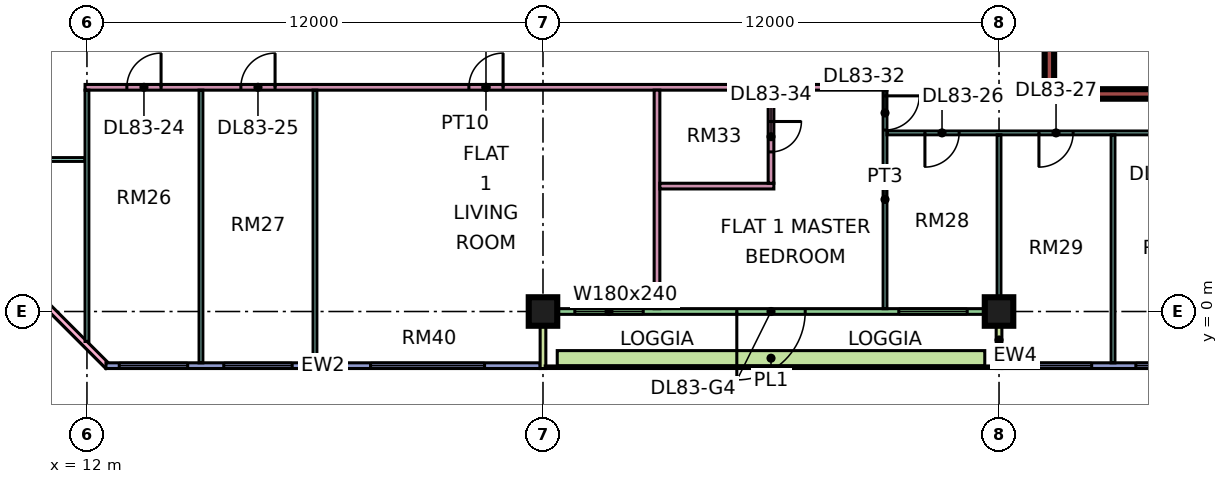
"""IFC4 building model, lengths in metres.
Left out: names, types, materials, properties, quantities, classifications, styles, units other than length and angle.
Written with IfcOpenShell. Run it as: python <this file> out.ifc"""

import sys

from ifc_helpers import new_model, si_unit, direction, frame, frame_2d, origin, origin_2d, place, context, subcontext, project, spatial, rectangle, extrude, element, fill, save


model = new_model("IFC4")
c1 = context("Model", 3, precision=1e-05, world=origin(), true_north=direction((0.0, 1.0)))
c2 = subcontext(c1, "Body", "Model", "MODEL_VIEW")
j1 = project(units=[si_unit("LENGTHUNIT", "METRE"), si_unit("PLANEANGLEUNIT", "RADIAN")], contexts=[c1])
p1 = place(None, origin())
s1 = spatial("IfcSite", under=j1, at=p1, CompositionType="ELEMENT")
p2 = place(p1, origin())
s2 = spatial("IfcBuilding", under=s1, at=p2, CompositionType="ELEMENT")
p3 = place(p2, frame((0.0, 0.0, 357.65)))
s3 = spatial("IfcBuildingStorey", under=s2, at=p3, CompositionType="ELEMENT", Elevation=357.65)
for number, where, z_axis, x_axis in (
    (1, (24.0, 0.0, 0.0), (0.0, 0.0, 1.0), (1.0, 0.0, 0.0)),
    (2, (36.0, 0.0, 0.0), (0.0, 0.0, 1.0), (1.0, 0.0, 0.0)),
):
    element("IfcColumn", number, at=place(p3, frame(where, z_axis=z_axis, x_axis=x_axis)), inside=s3, PredefinedType="COLUMN", context=c2, shape_type="SweptSolid", body=[
        extrude(rectangle(XDim=0.75, YDim=0.75, at=origin_2d()), origin(), (0.0, 0.0, 1.0), 3.75),
    ])
p4 = place(p3, frame((37.2, 5.725, 0.0), z_axis=(0.0, 0.0, 1.0), x_axis=(1.0, 0.0, 0.0)))
e3 = element("IfcWall", 3, at=p4, inside=s3, PredefinedType="SHEAR", context=c2, shape_type="SweptSolid", body=[
    extrude(rectangle(XDim=3.45, YDim=0.25, at=frame_2d((1.725, 0.0))), origin(), (0.0, 0.0, 1.0), 3.75),
])
p5 = place(p3, frame((37.325, 5.85, 0.0), z_axis=(0.0, 0.0, 1.0), x_axis=(0.0, 1.0, 0.0)))
e4 = element("IfcWall", 4, at=p5, inside=s3, PredefinedType="SHEAR", context=c2, shape_type="SweptSolid", body=[
    extrude(rectangle(XDim=6.5, YDim=0.25, at=frame_2d((3.25, 0.0))), origin(), (0.0, 0.0, 1.0), 3.75),
])
p6 = place(p3, frame((-1.447, 12.553, 0.0), z_axis=(0.0, 0.0, 1.0), x_axis=(0.707106781187, -0.707106781187, 0.0)))
e5 = element("IfcWall", 5, at=p6, inside=s3, PredefinedType="SOLIDWALL", context=c2, shape_type="SweptSolid", body=[
    extrude(rectangle(XDim=19.799, YDim=0.15, at=frame_2d((9.899, 0.0))), origin(), (0.0, 0.0, 1.0), 3.35),
])
p7 = place(p6, frame((2.212, 0.0, 0.45)))
e6 = element("IfcOpeningElement", 6, at=p7, cuts=e5, PredefinedType="OPENING", context=c2, shape_type="SweptSolid", body=[
    extrude(rectangle(XDim=3.0, YDim=2.4, at=frame_2d((1.5, 1.2))), frame((0.0, 0.085, 0.0), z_axis=(0.0, -1.0, 0.0), x_axis=(1.0, 0.0, 0.0)), (0.0, 0.0, 1.0), 0.17),
])
p8 = place(p6, frame((10.216, 0.0, 0.45)))
e7 = element("IfcOpeningElement", 7, at=p8, cuts=e5, PredefinedType="OPENING", context=c2, shape_type="SweptSolid", body=[
    extrude(rectangle(XDim=3.0, YDim=2.4, at=frame_2d((1.5, 1.2))), frame((0.0, 0.085, 0.0), z_axis=(0.0, -1.0, 0.0), x_axis=(1.0, 0.0, 0.0)), (0.0, 0.0, 1.0), 0.17),
])
p9 = place(p3, frame((12.5, -1.425, 0.0), z_axis=(0.0, 0.0, 1.0), x_axis=(1.0, 0.0, 0.0)))
e8 = element("IfcWall", 8, at=p9, inside=s3, PredefinedType="SOLIDWALL", context=c2, shape_type="SweptSolid", body=[
    extrude(rectangle(XDim=11.425, YDim=0.15, at=frame_2d((5.712, 0.0))), origin(), (0.0, 0.0, 1.0), 3.35),
])
p10 = place(p9, frame((0.35, 0.0, 0.45)))
e9 = element("IfcOpeningElement", 9, at=p10, cuts=e8, PredefinedType="OPENING", context=c2, shape_type="SweptSolid", body=[
    extrude(rectangle(XDim=1.8, YDim=2.4, at=frame_2d((0.9, 1.2))), frame((0.0, 0.085, 0.0), z_axis=(0.0, -1.0, 0.0), x_axis=(1.0, 0.0, 0.0)), (0.0, 0.0, 1.0), 0.17),
])
p11 = place(p9, frame((3.1, 0.0, 0.45)))
e10 = element("IfcOpeningElement", 10, at=p11, cuts=e8, PredefinedType="OPENING", context=c2, shape_type="SweptSolid", body=[
    extrude(rectangle(XDim=1.8, YDim=2.4, at=frame_2d((0.9, 1.2))), frame((0.0, 0.085, 0.0), z_axis=(0.0, -1.0, 0.0), x_axis=(1.0, 0.0, 0.0)), (0.0, 0.0, 1.0), 0.17),
])
p12 = place(p9, frame((6.962, 0.0, 0.45)))
e11 = element("IfcOpeningElement", 11, at=p12, cuts=e8, PredefinedType="OPENING", context=c2, shape_type="SweptSolid", body=[
    extrude(rectangle(XDim=3.0, YDim=2.4, at=frame_2d((1.5, 1.2))), frame((0.0, 0.085, 0.0), z_axis=(0.0, -1.0, 0.0), x_axis=(1.0, 0.0, 0.0)), (0.0, 0.0, 1.0), 0.17),
])
p13 = place(p3, frame((24.075, 0.0, 0.0), z_axis=(0.0, 0.0, 1.0), x_axis=(1.0, 0.0, 0.0)))
e12 = element("IfcWall", 12, at=p13, inside=s3, PredefinedType="SOLIDWALL", context=c2, shape_type="SweptSolid", body=[
    extrude(rectangle(XDim=11.85, YDim=0.15, at=frame_2d((5.925, 0.0))), origin(), (0.0, 0.0, 1.0), 3.35),
])
p14 = place(p13, frame((0.762, 0.0, 0.45)))
e13 = element("IfcOpeningElement", 13, at=p14, cuts=e12, PredefinedType="OPENING", context=c2, shape_type="SweptSolid", body=[
    extrude(rectangle(XDim=1.8, YDim=2.4, at=frame_2d((0.9, 1.2))), frame((0.0, 0.085, 0.0), z_axis=(0.0, -1.0, 0.0), x_axis=(1.0, 0.0, 0.0)), (0.0, 0.0, 1.0), 0.17),
])
p15 = place(p13, frame((5.025, 0.0, 0.0)))
e14 = element("IfcOpeningElement", 14, at=p15, cuts=e12, PredefinedType="OPENING", context=c2, shape_type="SweptSolid", body=[
    extrude(rectangle(XDim=1.8, YDim=2.4, at=frame_2d((0.9, 1.2))), frame((0.0, 0.085, 0.0), z_axis=(0.0, -1.0, 0.0), x_axis=(1.0, 0.0, 0.0)), (0.0, 0.0, 1.0), 0.17),
])
p16 = place(p13, frame((9.288, 0.0, 0.45)))
e15 = element("IfcOpeningElement", 15, at=p16, cuts=e12, PredefinedType="OPENING", context=c2, shape_type="SweptSolid", body=[
    extrude(rectangle(XDim=1.8, YDim=2.4, at=frame_2d((0.9, 1.2))), frame((0.0, 0.085, 0.0), z_axis=(0.0, -1.0, 0.0), x_axis=(1.0, 0.0, 0.0)), (0.0, 0.0, 1.0), 0.17),
])
for number, where, z_axis, x_axis in (
    (16, (24.0, -1.5, 0.0), (0.0, 0.0, 1.0), (0.0, 1.0, 0.0)),
    (17, (36.0, -1.5, 0.0), (0.0, 0.0, 1.0), (0.0, 1.0, 0.0)),
):
    element("IfcWall", number, at=place(p3, frame(where, z_axis=z_axis, x_axis=x_axis)), inside=s3, PredefinedType="SOLIDWALL", context=c2, shape_type="SweptSolid", body=[
        extrude(rectangle(XDim=1.5, YDim=0.15, at=frame_2d((0.75, 0.0))), origin(), (0.0, 0.0, 1.0), 3.35),
    ])
p17 = place(p3, frame((36.075, -1.425, 0.0), z_axis=(0.0, 0.0, 1.0), x_axis=(1.0, 0.0, 0.0)))
e18 = element("IfcWall", 18, at=p17, inside=s3, PredefinedType="SOLIDWALL", context=c2, shape_type="SweptSolid", body=[
    extrude(rectangle(XDim=11.85, YDim=0.15, at=frame_2d((5.925, 0.0))), origin(), (0.0, 0.0, 1.0), 3.35),
])
p18 = place(p17, frame((0.562, 0.0, 0.45)))
e19 = element("IfcOpeningElement", 19, at=p18, cuts=e18, PredefinedType="OPENING", context=c2, shape_type="SweptSolid", body=[
    extrude(rectangle(XDim=1.8, YDim=2.4, at=frame_2d((0.9, 1.2))), frame((0.0, 0.085, 0.0), z_axis=(0.0, -1.0, 0.0), x_axis=(1.0, 0.0, 0.0)), (0.0, 0.0, 1.0), 0.17),
])
p19 = place(p17, frame((3.525, 0.0, 0.45)))
e20 = element("IfcOpeningElement", 20, at=p19, cuts=e18, PredefinedType="OPENING", context=c2, shape_type="SweptSolid", body=[
    extrude(rectangle(XDim=1.8, YDim=2.4, at=frame_2d((0.9, 1.2))), frame((0.0, 0.085, 0.0), z_axis=(0.0, -1.0, 0.0), x_axis=(1.0, 0.0, 0.0)), (0.0, 0.0, 1.0), 0.17),
])
p20 = place(p17, frame((6.525, 0.0, 0.45)))
e21 = element("IfcOpeningElement", 21, at=p20, cuts=e18, PredefinedType="OPENING", context=c2, shape_type="SweptSolid", body=[
    extrude(rectangle(XDim=1.8, YDim=2.4, at=frame_2d((0.9, 1.2))), frame((0.0, 0.085, 0.0), z_axis=(0.0, -1.0, 0.0), x_axis=(1.0, 0.0, 0.0)), (0.0, 0.0, 1.0), 0.17),
])
p21 = place(p17, frame((9.488, 0.0, 0.45)))
e22 = element("IfcOpeningElement", 22, at=p21, cuts=e18, PredefinedType="OPENING", context=c2, shape_type="SweptSolid", body=[
    extrude(rectangle(XDim=1.8, YDim=2.4, at=frame_2d((0.9, 1.2))), frame((0.0, 0.085, 0.0), z_axis=(0.0, -1.0, 0.0), x_axis=(1.0, 0.0, 0.0)), (0.0, 0.0, 1.0), 0.17),
])
p22 = place(p3, frame((24.375, -1.229, 0.0), z_axis=(0.0, 0.0, 1.0), x_axis=(1.0, 0.0, 0.0)))
e23 = element("IfcWall", 23, at=p22, inside=s3, PredefinedType="SOLIDWALL", context=c2, shape_type="SweptSolid", body=[
    extrude(rectangle(XDim=11.25, YDim=0.4, at=frame_2d((5.625, 0.0))), origin(), (0.0, 0.0, 1.0), 0.7),
])
p23 = place(p3, frame((9.05, 4.0, 0.0), z_axis=(0.0, 0.0, 1.0), x_axis=(1.0, 0.0, 0.0)))
e24 = element("IfcWall", 24, at=p23, inside=s3, PredefinedType="PARTITIONING", context=c2, shape_type="SweptSolid", body=[
    extrude(rectangle(XDim=2.9, YDim=0.1, at=frame_2d((1.45, 0.0))), origin(), (0.0, 0.0, 1.0), 3.35),
])
p24 = place(p3, frame((11.95, 5.9, 0.0), z_axis=(0.0, 0.0, 1.0), x_axis=(1.0, 0.0, 0.0)))
e25 = element("IfcWall", 25, at=p24, inside=s3, PredefinedType="PARTITIONING", context=c2, shape_type="SweptSolid", body=[
    extrude(rectangle(XDim=21.1, YDim=0.15, at=frame_2d((10.55, 0.0))), origin(), (0.0, 0.0, 1.0), 3.35),
])
p25 = place(p24, frame((1.1, 0.0, 0.0)))
e26 = element("IfcOpeningElement", 26, at=p25, cuts=e25, PredefinedType="OPENING", context=c2, shape_type="SweptSolid", body=[
    extrude(rectangle(XDim=0.9, YDim=2.1, at=frame_2d((0.45, 1.05))), frame((0.0, 0.085, 0.0), z_axis=(0.0, -1.0, 0.0), x_axis=(1.0, 0.0, 0.0)), (0.0, 0.0, 1.0), 0.17),
])
p26 = place(p24, frame((4.1, 0.0, 0.0)))
e27 = element("IfcOpeningElement", 27, at=p26, cuts=e25, PredefinedType="OPENING", context=c2, shape_type="SweptSolid", body=[
    extrude(rectangle(XDim=0.9, YDim=2.1, at=frame_2d((0.45, 1.05))), frame((0.0, 0.085, 0.0), z_axis=(0.0, -1.0, 0.0), x_axis=(1.0, 0.0, 0.0)), (0.0, 0.0, 1.0), 0.17),
])
p27 = place(p24, frame((10.1, 0.0, 0.0)))
e28 = element("IfcOpeningElement", 28, at=p27, cuts=e25, PredefinedType="OPENING", context=c2, shape_type="SweptSolid", body=[
    extrude(rectangle(XDim=0.9, YDim=2.1, at=frame_2d((0.45, 1.05))), frame((0.0, 0.085, 0.0), z_axis=(0.0, -1.0, 0.0), x_axis=(1.0, 0.0, 0.0)), (0.0, 0.0, 1.0), 0.17),
])
p28 = place(p3, frame((12.0, -0.788, 0.0), z_axis=(0.0, 0.0, 1.0), x_axis=(0.0, 1.0, 0.0)))
e29 = element("IfcWall", 29, at=p28, inside=s3, PredefinedType="PARTITIONING", context=c2, shape_type="SweptSolid", body=[
    extrude(rectangle(XDim=6.613, YDim=0.1, at=frame_2d((3.306, 0.0))), origin(), (0.0, 0.0, 1.0), 3.35),
])
p29 = place(p3, frame((15.0, -1.351, 0.0), z_axis=(0.0, 0.0, 1.0), x_axis=(0.0, 1.0, 0.0)))
e30 = element("IfcWall", 30, at=p29, inside=s3, PredefinedType="PARTITIONING", context=c2, shape_type="SweptSolid", body=[
    extrude(rectangle(XDim=7.176, YDim=0.1, at=frame_2d((3.588, 0.0))), origin(), (0.0, 0.0, 1.0), 3.35),
])
p30 = place(p3, frame((18.0, -1.35, 0.0), z_axis=(0.0, 0.0, 1.0), x_axis=(0.0, 1.0, 0.0)))
e31 = element("IfcWall", 31, at=p30, inside=s3, PredefinedType="PARTITIONING", context=c2, shape_type="SweptSolid", body=[
    extrude(rectangle(XDim=7.175, YDim=0.1, at=frame_2d((3.587, 0.0))), origin(), (0.0, 0.0, 1.0), 3.35),
])
p31 = place(p3, frame((27.0, 0.074, 0.0), z_axis=(0.0, 0.0, 1.0), x_axis=(0.0, 1.0, 0.0)))
e32 = element("IfcWall", 32, at=p31, inside=s3, PredefinedType="PARTITIONING", context=c2, shape_type="SweptSolid", body=[
    extrude(rectangle(XDim=5.751, YDim=0.15, at=frame_2d((2.875, 0.0))), origin(), (0.0, 0.0, 1.0), 3.35),
])
p32 = place(p3, frame((27.075, 3.3, 0.0), z_axis=(0.0, 0.0, 1.0), x_axis=(1.0, 0.0, 0.0)))
e33 = element("IfcWall", 33, at=p32, inside=s3, PredefinedType="PARTITIONING", context=c2, shape_type="SweptSolid", body=[
    extrude(rectangle(XDim=3.0, YDim=0.15, at=frame_2d((1.5, 0.0))), origin(), (0.0, 0.0, 1.0), 3.35),
])
p33 = place(p3, frame((30.0, 3.375, 0.0), z_axis=(0.0, 0.0, 1.0), x_axis=(0.0, 1.0, 0.0)))
e34 = element("IfcWall", 34, at=p33, inside=s3, PredefinedType="PARTITIONING", context=c2, shape_type="SweptSolid", body=[
    extrude(rectangle(XDim=2.45, YDim=0.15, at=frame_2d((1.225, 0.0))), origin(), (0.0, 0.0, 1.0), 3.35),
])
p34 = place(p33, frame((0.825, 0.0, 0.0)))
e35 = element("IfcOpeningElement", 35, at=p34, cuts=e34, PredefinedType="OPENING", context=c2, shape_type="SweptSolid", body=[
    extrude(rectangle(XDim=0.8, YDim=2.1, at=frame_2d((0.4, 1.05))), frame((0.0, 0.085, 0.0), z_axis=(0.0, -1.0, 0.0), x_axis=(1.0, 0.0, 0.0)), (0.0, 0.0, 1.0), 0.17),
])
p35 = place(p3, frame((33.0, 0.074, 0.0), z_axis=(0.0, 0.0, 1.0), x_axis=(0.0, 1.0, 0.0)))
e36 = element("IfcWall", 36, at=p35, inside=s3, PredefinedType="PARTITIONING", context=c2, shape_type="SweptSolid", body=[
    extrude(rectangle(XDim=5.751, YDim=0.1, at=frame_2d((2.875, 0.0))), origin(), (0.0, 0.0, 1.0), 3.35),
])
p36 = place(p35, frame((4.701, 0.0, 0.0)))
e37 = element("IfcOpeningElement", 37, at=p36, cuts=e36, PredefinedType="OPENING", context=c2, shape_type="SweptSolid", body=[
    extrude(rectangle(XDim=0.9, YDim=2.1, at=frame_2d((0.45, 1.05))), frame((0.0, 0.06, 0.0), z_axis=(0.0, -1.0, 0.0), x_axis=(1.0, 0.0, 0.0)), (0.0, 0.0, 1.0), 0.12),
])
p37 = place(p3, frame((33.05, 4.7, 0.0), z_axis=(0.0, 0.0, 1.0), x_axis=(1.0, 0.0, 0.0)))
e38 = element("IfcWall", 38, at=p37, inside=s3, PredefinedType="PARTITIONING", context=c2, shape_type="SweptSolid", body=[
    extrude(rectangle(XDim=20.876, YDim=0.1, at=frame_2d((10.438, 0.0))), origin(), (0.0, 0.0, 1.0), 3.35),
])
p38 = place(p37, frame((1.0, 0.0, 0.0)))
e39 = element("IfcOpeningElement", 39, at=p38, cuts=e38, PredefinedType="OPENING", context=c2, shape_type="SweptSolid", body=[
    extrude(rectangle(XDim=0.9, YDim=2.1, at=frame_2d((0.45, 1.05))), frame((0.0, 0.06, 0.0), z_axis=(0.0, -1.0, 0.0), x_axis=(1.0, 0.0, 0.0)), (0.0, 0.0, 1.0), 0.12),
])
p39 = place(p37, frame((4.0, 0.0, 0.0)))
e40 = element("IfcOpeningElement", 40, at=p39, cuts=e38, PredefinedType="OPENING", context=c2, shape_type="SweptSolid", body=[
    extrude(rectangle(XDim=0.9, YDim=2.1, at=frame_2d((0.45, 1.05))), frame((0.0, 0.06, 0.0), z_axis=(0.0, -1.0, 0.0), x_axis=(1.0, 0.0, 0.0)), (0.0, 0.0, 1.0), 0.12),
])
p40 = place(p37, frame((7.0, 0.0, 0.0)))
e41 = element("IfcOpeningElement", 41, at=p40, cuts=e38, PredefinedType="OPENING", context=c2, shape_type="SweptSolid", body=[
    extrude(rectangle(XDim=0.9, YDim=2.1, at=frame_2d((0.45, 1.05))), frame((0.0, 0.06, 0.0), z_axis=(0.0, -1.0, 0.0), x_axis=(1.0, 0.0, 0.0)), (0.0, 0.0, 1.0), 0.12),
])
p41 = place(p37, frame((10.0, 0.0, 0.0)))
e42 = element("IfcOpeningElement", 42, at=p41, cuts=e38, PredefinedType="OPENING", context=c2, shape_type="SweptSolid", body=[
    extrude(rectangle(XDim=0.9, YDim=2.1, at=frame_2d((0.45, 1.05))), frame((0.0, 0.06, 0.0), z_axis=(0.0, -1.0, 0.0), x_axis=(1.0, 0.0, 0.0)), (0.0, 0.0, 1.0), 0.12),
])
p42 = place(p37, frame((16.0, 0.0, 0.0)))
e43 = element("IfcOpeningElement", 43, at=p42, cuts=e38, PredefinedType="OPENING", context=c2, shape_type="SweptSolid", body=[
    extrude(rectangle(XDim=0.9, YDim=2.1, at=frame_2d((0.45, 1.05))), frame((0.0, 0.06, 0.0), z_axis=(0.0, -1.0, 0.0), x_axis=(1.0, 0.0, 0.0)), (0.0, 0.0, 1.0), 0.12),
])
p43 = place(p3, frame((36.0, 0.0, 0.0), z_axis=(0.0, 0.0, 1.0), x_axis=(0.0, 1.0, 0.0)))
e44 = element("IfcWall", 44, at=p43, inside=s3, PredefinedType="PARTITIONING", context=c2, shape_type="SweptSolid", body=[
    extrude(rectangle(XDim=4.65, YDim=0.1, at=frame_2d((2.325, 0.0))), origin(), (0.0, 0.0, 1.0), 3.35),
])
p44 = place(p3, frame((39.0, -1.351, 0.0), z_axis=(0.0, 0.0, 1.0), x_axis=(0.0, 1.0, 0.0)))
e45 = element("IfcWall", 45, at=p44, inside=s3, PredefinedType="PARTITIONING", context=c2, shape_type="SweptSolid", body=[
    extrude(rectangle(XDim=6.001, YDim=0.1, at=frame_2d((3.0, 0.0))), origin(), (0.0, 0.0, 1.0), 3.35),
])
p45 = place(p10, origin())
e46 = element("IfcWindow", 46, at=p45, inside=s3, PartitioningType="SINGLE_PANEL", PredefinedType="WINDOW", context=c2, shape_type="SweptSolid", body=[
    extrude(rectangle(XDim=1.8, YDim=2.4, at=frame_2d((0.9, 1.2))), frame((0.0, 0.03, 0.0), z_axis=(0.0, -1.0, 0.0), x_axis=(1.0, 0.0, 0.0)), (0.0, 0.0, 1.0), 0.06),
])
fill(e9, e46)
p46 = place(p11, origin())
e47 = element("IfcWindow", 47, at=p46, inside=s3, PartitioningType="SINGLE_PANEL", PredefinedType="WINDOW", context=c2, shape_type="SweptSolid", body=[
    extrude(rectangle(XDim=1.8, YDim=2.4, at=frame_2d((0.9, 1.2))), frame((0.0, 0.03, 0.0), z_axis=(0.0, -1.0, 0.0), x_axis=(1.0, 0.0, 0.0)), (0.0, 0.0, 1.0), 0.06),
])
fill(e10, e47)
p47 = place(p12, origin())
e48 = element("IfcWindow", 48, at=p47, inside=s3, PartitioningType="SINGLE_PANEL", PredefinedType="WINDOW", context=c2, shape_type="SweptSolid", body=[
    extrude(rectangle(XDim=3.0, YDim=2.4, at=frame_2d((1.5, 1.2))), frame((0.0, 0.03, 0.0), z_axis=(0.0, -1.0, 0.0), x_axis=(1.0, 0.0, 0.0)), (0.0, 0.0, 1.0), 0.06),
])
fill(e11, e48)
p48 = place(p14, origin())
e49 = element("IfcWindow", 49, at=p48, inside=s3, PartitioningType="SINGLE_PANEL", PredefinedType="WINDOW", context=c2, shape_type="SweptSolid", body=[
    extrude(rectangle(XDim=1.8, YDim=2.4, at=frame_2d((0.9, 1.2))), frame((0.0, 0.03, 0.0), z_axis=(0.0, -1.0, 0.0), x_axis=(1.0, 0.0, 0.0)), (0.0, 0.0, 1.0), 0.06),
])
fill(e13, e49)
p49 = place(p15, frame((1.8, 0.0, 0.0), z_axis=(0.0, 0.0, 1.0), x_axis=(-1.0, 0.0, 0.0)))
e50 = element("IfcDoor", 50, at=p49, inside=s3, OperationType="DOUBLE_DOOR_SINGLE_SWING", PredefinedType="DOOR", context=c2, shape_type="SweptSolid", body=[
    extrude(rectangle(XDim=1.8, YDim=2.4, at=frame_2d((0.9, 1.2))), frame((0.0, 0.025, 0.0), z_axis=(0.0, -1.0, 0.0), x_axis=(1.0, 0.0, 0.0)), (0.0, 0.0, 1.0), 0.05),
])
fill(e14, e50)
p50 = place(p16, origin())
e51 = element("IfcWindow", 51, at=p50, inside=s3, PartitioningType="SINGLE_PANEL", PredefinedType="WINDOW", context=c2, shape_type="SweptSolid", body=[
    extrude(rectangle(XDim=1.8, YDim=2.4, at=frame_2d((0.9, 1.2))), frame((0.0, 0.03, 0.0), z_axis=(0.0, -1.0, 0.0), x_axis=(1.0, 0.0, 0.0)), (0.0, 0.0, 1.0), 0.06),
])
fill(e15, e51)
p51 = place(p18, origin())
e52 = element("IfcWindow", 52, at=p51, inside=s3, PartitioningType="SINGLE_PANEL", PredefinedType="WINDOW", context=c2, shape_type="SweptSolid", body=[
    extrude(rectangle(XDim=1.8, YDim=2.4, at=frame_2d((0.9, 1.2))), frame((0.0, 0.03, 0.0), z_axis=(0.0, -1.0, 0.0), x_axis=(1.0, 0.0, 0.0)), (0.0, 0.0, 1.0), 0.06),
])
fill(e19, e52)
p52 = place(p19, origin())
e53 = element("IfcWindow", 53, at=p52, inside=s3, PartitioningType="SINGLE_PANEL", PredefinedType="WINDOW", context=c2, shape_type="SweptSolid", body=[
    extrude(rectangle(XDim=1.8, YDim=2.4, at=frame_2d((0.9, 1.2))), frame((0.0, 0.03, 0.0), z_axis=(0.0, -1.0, 0.0), x_axis=(1.0, 0.0, 0.0)), (0.0, 0.0, 1.0), 0.06),
])
fill(e20, e53)
p53 = place(p25, frame((0.9, 0.0, 0.0), z_axis=(0.0, 0.0, 1.0), x_axis=(-1.0, 0.0, 0.0)))
e54 = element("IfcDoor", 54, at=p53, inside=s3, OperationType="SINGLE_SWING_RIGHT", PredefinedType="DOOR", context=c2, shape_type="SweptSolid", body=[
    extrude(rectangle(XDim=0.9, YDim=2.1, at=frame_2d((0.45, 1.05))), frame((0.0, 0.025, 0.0), z_axis=(0.0, -1.0, 0.0), x_axis=(1.0, 0.0, 0.0)), (0.0, 0.0, 1.0), 0.05),
])
fill(e26, e54)
p54 = place(p26, frame((0.9, 0.0, 0.0), z_axis=(0.0, 0.0, 1.0), x_axis=(-1.0, 0.0, 0.0)))
e55 = element("IfcDoor", 55, at=p54, inside=s3, OperationType="SINGLE_SWING_RIGHT", PredefinedType="DOOR", context=c2, shape_type="SweptSolid", body=[
    extrude(rectangle(XDim=0.9, YDim=2.1, at=frame_2d((0.45, 1.05))), frame((0.0, 0.025, 0.0), z_axis=(0.0, -1.0, 0.0), x_axis=(1.0, 0.0, 0.0)), (0.0, 0.0, 1.0), 0.05),
])
fill(e27, e55)
p55 = place(p38, frame((0.9, 0.0, 0.0), z_axis=(0.0, 0.0, 1.0), x_axis=(-1.0, 0.0, 0.0)))
e56 = element("IfcDoor", 56, at=p55, inside=s3, OperationType="SINGLE_SWING_LEFT", PredefinedType="DOOR", context=c2, shape_type="SweptSolid", body=[
    extrude(rectangle(XDim=0.9, YDim=2.1, at=frame_2d((0.45, 1.05))), frame((0.0, 0.025, 0.0), z_axis=(0.0, -1.0, 0.0), x_axis=(1.0, 0.0, 0.0)), (0.0, 0.0, 1.0), 0.05),
])
fill(e39, e56)
p56 = place(p39, frame((0.9, 0.0, 0.0), z_axis=(0.0, 0.0, 1.0), x_axis=(-1.0, 0.0, 0.0)))
e57 = element("IfcDoor", 57, at=p56, inside=s3, OperationType="SINGLE_SWING_LEFT", PredefinedType="DOOR", context=c2, shape_type="SweptSolid", body=[
    extrude(rectangle(XDim=0.9, YDim=2.1, at=frame_2d((0.45, 1.05))), frame((0.0, 0.025, 0.0), z_axis=(0.0, -1.0, 0.0), x_axis=(1.0, 0.0, 0.0)), (0.0, 0.0, 1.0), 0.05),
])
fill(e40, e57)
p57 = place(p36, origin())
e58 = element("IfcDoor", 58, at=p57, inside=s3, OperationType="SINGLE_SWING_RIGHT", PredefinedType="DOOR", context=c2, shape_type="SweptSolid", body=[
    extrude(rectangle(XDim=0.9, YDim=2.1, at=frame_2d((0.45, 1.05))), frame((0.0, 0.025, 0.0), z_axis=(0.0, -1.0, 0.0), x_axis=(1.0, 0.0, 0.0)), (0.0, 0.0, 1.0), 0.05),
])
fill(e37, e58)
p58 = place(p34, origin())
e59 = element("IfcDoor", 59, at=p58, inside=s3, OperationType="SINGLE_SWING_RIGHT", PredefinedType="DOOR", context=c2, shape_type="SweptSolid", body=[
    extrude(rectangle(XDim=0.8, YDim=2.1, at=frame_2d((0.4, 1.05))), frame((0.0, 0.025, 0.0), z_axis=(0.0, -1.0, 0.0), x_axis=(1.0, 0.0, 0.0)), (0.0, 0.0, 1.0), 0.05),
])
fill(e35, e59)
p59 = place(p27, frame((0.9, 0.0, 0.0), z_axis=(0.0, 0.0, 1.0), x_axis=(-1.0, 0.0, 0.0)))
e60 = element("IfcDoor", 60, at=p59, inside=s3, OperationType="SINGLE_SWING_RIGHT", PredefinedType="DOOR", context=c2, shape_type="SweptSolid", body=[
    extrude(rectangle(XDim=0.9, YDim=2.1, at=frame_2d((0.45, 1.05))), frame((0.0, 0.025, 0.0), z_axis=(0.0, -1.0, 0.0), x_axis=(1.0, 0.0, 0.0)), (0.0, 0.0, 1.0), 0.05),
])
fill(e28, e60)
save(model, sys.argv[1])
